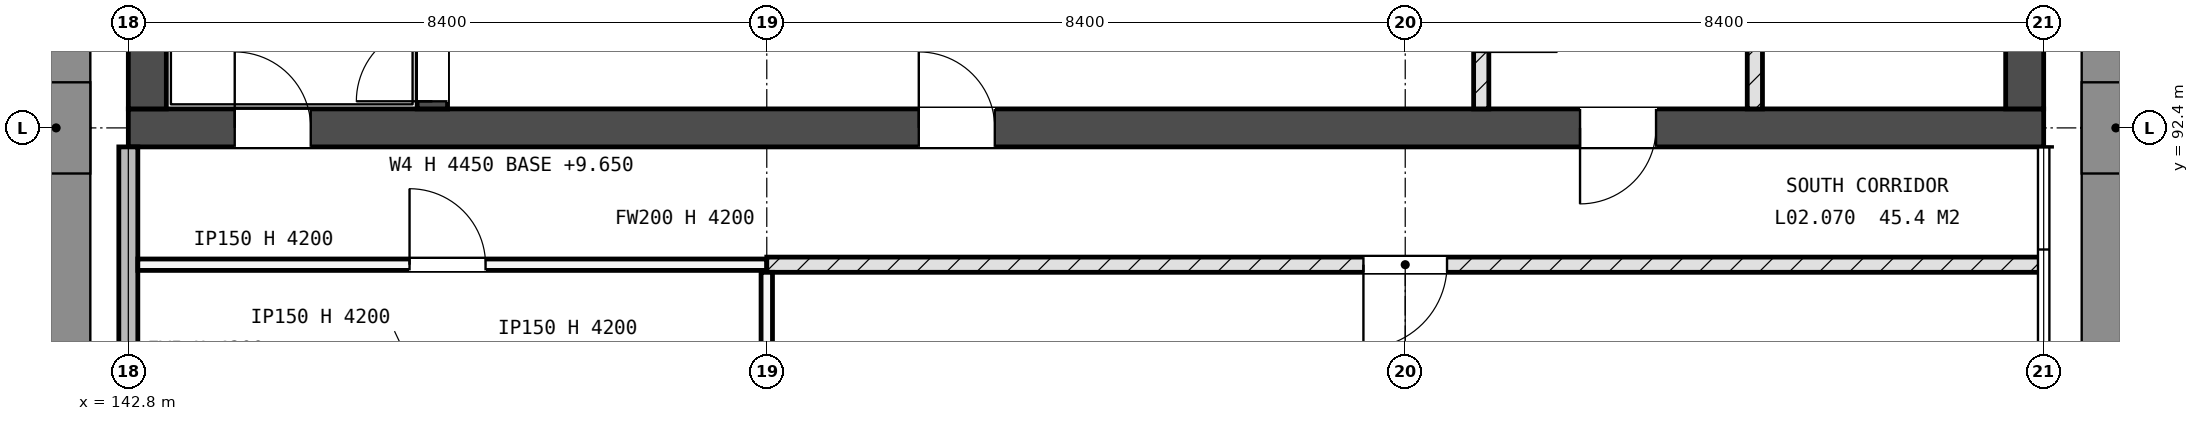
"""IFC4 building model, lengths in metres.
Left out: names, types, materials, properties, quantities, classifications, styles, units other than length and angle.
Written with IfcOpenShell. Run it as: python <this file> out.ifc"""

import sys

from ifc_helpers import new_model, si_unit, direction, frame, frame_2d, origin, place, context, subcontext, project, spatial, rectangle, extrude, element, fill, save


model = new_model("IFC4")
c1 = context("Model", 3, precision=1e-05, world=origin(), true_north=direction((0.0, 1.0)))
c2 = subcontext(c1, "Body", "Model", "MODEL_VIEW")
j1 = project(units=[si_unit("LENGTHUNIT", "METRE"), si_unit("PLANEANGLEUNIT", "RADIAN")], contexts=[c1])
p1 = place(None, origin())
s1 = spatial("IfcSite", under=j1, at=p1, CompositionType="ELEMENT")
p2 = place(p1, origin())
s2 = spatial("IfcBuilding", under=s1, at=p2, CompositionType="ELEMENT")
p3 = place(p2, frame((0.0, 0.0, 9.9)))
s3 = spatial("IfcBuildingStorey", under=s2, at=p3, CompositionType="ELEMENT", Elevation=9.9)
p4 = place(p3, frame((142.8, 92.4, -0.25), z_axis=(0.0, 0.0, 1.0), x_axis=(1.0, 0.0, 0.0)))
e1 = element("IfcWall", 1, at=p4, inside=s3, PredefinedType="SHEAR", context=c2, shape_type="SweptSolid", body=[
    extrude(rectangle(XDim=25.2, YDim=0.5, at=frame_2d((12.6, 0.0))), origin(), (0.0, 0.0, 1.0), 4.45),
])
p5 = place(p4, frame((1.4, 0.0, 0.25)))
e2 = element("IfcOpeningElement", 2, at=p5, cuts=e1, PredefinedType="OPENING", context=c2, shape_type="SweptSolid", body=[
    extrude(rectangle(XDim=1.0, YDim=2.1, at=frame_2d((0.5, 1.05))), frame((0.0, 0.26, 0.0), z_axis=(0.0, -1.0, 0.0), x_axis=(1.0, 0.0, 0.0)), (0.0, 0.0, 1.0), 0.52),
])
p6 = place(p4, frame((19.1, 0.0, 0.25)))
e3 = element("IfcOpeningElement", 3, at=p6, cuts=e1, PredefinedType="OPENING", context=c2, shape_type="SweptSolid", body=[
    extrude(rectangle(XDim=1.0, YDim=2.1, at=frame_2d((0.5, 1.05))), frame((0.0, 0.26, 0.0), z_axis=(0.0, -1.0, 0.0), x_axis=(1.0, 0.0, 0.0)), (0.0, 0.0, 1.0), 0.52),
])
p7 = place(p4, frame((10.4, 0.0, 0.25)))
e4 = element("IfcOpeningElement", 4, at=p7, cuts=e1, PredefinedType="OPENING", context=c2, shape_type="SweptSolid", body=[
    extrude(rectangle(XDim=1.0, YDim=2.1, at=frame_2d((0.5, 1.05))), frame((0.0, 0.26, 0.0), z_axis=(0.0, -1.0, 0.0), x_axis=(1.0, 0.0, 0.0)), (0.0, 0.0, 1.0), 0.52),
])
p8 = place(p3, frame((143.05, 92.65, -0.25), z_axis=(0.0, 0.0, 1.0), x_axis=(0.0, 1.0, 0.0)))
e5 = element("IfcWall", 5, at=p8, inside=s3, PredefinedType="SHEAR", context=c2, shape_type="SweptSolid", body=[
    extrude(rectangle(XDim=16.3, YDim=0.5, at=frame_2d((8.15, 0.0))), origin(), (0.0, 0.0, 1.0), 4.45),
])
p9 = place(p8, frame((2.95, 0.0, 1.85)))
e6 = element("IfcOpeningElement", 6, at=p9, cuts=e5, PredefinedType="OPENING", context=c2, shape_type="SweptSolid", body=[
    extrude(rectangle(XDim=1.2, YDim=0.9, at=frame_2d((0.6, 0.45))), frame((0.0, 0.26, 0.0), z_axis=(0.0, -1.0, 0.0), x_axis=(1.0, 0.0, 0.0)), (0.0, 0.0, 1.0), 0.52),
])
p10 = place(p3, frame((167.75, 92.65, -0.25), z_axis=(0.0, 0.0, 1.0), x_axis=(0.0, 1.0, 0.0)))
e7 = element("IfcWall", 7, at=p10, inside=s3, PredefinedType="SHEAR", context=c2, shape_type="SweptSolid", body=[
    extrude(rectangle(XDim=16.3, YDim=0.5, at=frame_2d((8.15, 0.0))), origin(), (0.0, 0.0, 1.0), 4.45),
])
p11 = place(p10, frame((12.15, 0.0, 1.85)))
e8 = element("IfcOpeningElement", 8, at=p11, cuts=e7, PredefinedType="OPENING", context=c2, shape_type="SweptSolid", body=[
    extrude(rectangle(XDim=1.2, YDim=0.9, at=frame_2d((0.6, 0.45))), frame((0.0, 0.26, 0.0), z_axis=(0.0, -1.0, 0.0), x_axis=(1.0, 0.0, 0.0)), (0.0, 0.0, 1.0), 0.52),
])
p12 = place(p3, frame((146.8, 92.65, -0.25), z_axis=(0.0, 0.0, 1.0), x_axis=(0.0, 1.0, 0.0)))
e9 = element("IfcWall", 9, at=p12, inside=s3, PredefinedType="SHEAR", context=c2, shape_type="SweptSolid", body=[
    extrude(rectangle(XDim=7.475, YDim=0.4, at=frame_2d((3.738, 0.0))), origin(), (0.0, 0.0, 1.0), 4.45),
])
p13 = place(p12, frame((0.1, 0.0, 0.25)))
e10 = element("IfcOpeningElement", 10, at=p13, cuts=e9, PredefinedType="OPENING", context=c2, shape_type="SweptSolid", body=[
    extrude(rectangle(XDim=1.0, YDim=2.1, at=frame_2d((0.5, 1.05))), frame((0.0, 0.21, 0.0), z_axis=(0.0, -1.0, 0.0), x_axis=(1.0, 0.0, 0.0)), (0.0, 0.0, 1.0), 0.42),
])
p14 = place(p3, frame((142.8, 84.5, 0.0), z_axis=(0.0, 0.0, 1.0), x_axis=(0.0, 1.0, 0.0)))
e11 = element("IfcWall", 11, at=p14, inside=s3, PredefinedType="STANDARD", context=c2, shape_type="SweptSolid", body=[
    extrude(rectangle(XDim=7.65, YDim=0.25, at=frame_2d((3.825, 0.0))), origin(), (0.0, 0.0, 1.0), 4.2),
])
p15 = place(p14, frame((2.2, 0.0, 2.1)))
e12 = element("IfcOpeningElement", 12, at=p15, cuts=e11, PredefinedType="OPENING", context=c2, shape_type="SweptSolid", body=[
    extrude(rectangle(XDim=0.9, YDim=0.6, at=frame_2d((0.45, 0.3))), frame((0.0, 0.135, 0.0), z_axis=(0.0, -1.0, 0.0), x_axis=(1.0, 0.0, 0.0)), (0.0, 0.0, 1.0), 0.27),
])
p16 = place(p3, frame((142.925, 90.6, 0.0), z_axis=(0.0, 0.0, 1.0), x_axis=(1.0, 0.0, 0.0)))
e13 = element("IfcWall", 13, at=p16, inside=s3, PredefinedType="PARTITIONING", context=c2, shape_type="SweptSolid", body=[
    extrude(rectangle(XDim=8.275, YDim=0.15, at=frame_2d((4.137, 0.0))), origin(), (0.0, 0.0, 1.0), 4.2),
])
p17 = place(p16, frame((3.575, 0.0, 0.0)))
e14 = element("IfcOpeningElement", 14, at=p17, cuts=e13, PredefinedType="OPENING", context=c2, shape_type="SweptSolid", body=[
    extrude(rectangle(XDim=1.0, YDim=2.1, at=frame_2d((0.5, 1.05))), frame((0.0, 0.085, 0.0), z_axis=(0.0, -1.0, 0.0), x_axis=(1.0, 0.0, 0.0)), (0.0, 0.0, 1.0), 0.17),
])
p18 = place(p3, frame((151.2, 90.6, 0.0), z_axis=(0.0, 0.0, 1.0), x_axis=(1.0, 0.0, 0.0)))
e15 = element("IfcWall", 15, at=p18, inside=s3, PredefinedType="SOLIDWALL", context=c2, shape_type="SweptSolid", body=[
    extrude(rectangle(XDim=16.8, YDim=0.2, at=frame_2d((8.4, 0.0))), origin(), (0.0, 0.0, 1.0), 4.2),
])
p19 = place(p18, frame((7.85, 0.0, 0.0)))
e16 = element("IfcOpeningElement", 16, at=p19, cuts=e15, PredefinedType="OPENING", context=c2, shape_type="SweptSolid", body=[
    extrude(rectangle(XDim=1.1, YDim=2.25, at=frame_2d((0.55, 1.125))), frame((0.0, 0.11, 0.0), z_axis=(0.0, -1.0, 0.0), x_axis=(1.0, 0.0, 0.0)), (0.0, 0.0, 1.0), 0.22),
])
p20 = place(p3, frame((151.2, 84.0, 0.0), z_axis=(0.0, 0.0, 1.0), x_axis=(0.0, 1.0, 0.0)))
e17 = element("IfcWall", 17, at=p20, inside=s3, PredefinedType="PARTITIONING", context=c2, shape_type="SweptSolid", body=[
    extrude(rectangle(XDim=6.5, YDim=0.15, at=frame_2d((3.25, 0.0))), origin(), (0.0, 0.0, 1.0), 3.4),
])
p21 = place(p3, frame((160.6, 92.65, 0.0), z_axis=(0.0, 0.0, 1.0), x_axis=(0.0, 1.0, 0.0)))
e18 = element("IfcWall", 18, at=p21, inside=s3, PredefinedType="SOLIDWALL", context=c2, shape_type="SweptSolid", body=[
    extrude(rectangle(XDim=12.45, YDim=0.2, at=frame_2d((6.225, 0.0))), origin(), (0.0, 0.0, 1.0), 4.2),
])
p22 = place(p21, frame((5.05, 0.0, 0.0)))
e19 = element("IfcOpeningElement", 19, at=p22, cuts=e18, PredefinedType="OPENING", context=c2, shape_type="SweptSolid", body=[
    extrude(rectangle(XDim=0.8, YDim=2.1, at=frame_2d((0.4, 1.05))), frame((0.0, 0.11, 0.0), z_axis=(0.0, -1.0, 0.0), x_axis=(1.0, 0.0, 0.0)), (0.0, 0.0, 1.0), 0.22),
])
p23 = place(p21, frame((0.75, 0.0, 0.0)))
e20 = element("IfcOpeningElement", 20, at=p23, cuts=e18, PredefinedType="OPENING", context=c2, shape_type="SweptSolid", body=[
    extrude(rectangle(XDim=1.0, YDim=2.1, at=frame_2d((0.5, 1.05))), frame((0.0, 0.11, 0.0), z_axis=(0.0, -1.0, 0.0), x_axis=(1.0, 0.0, 0.0)), (0.0, 0.0, 1.0), 0.22),
])
p24 = place(p3, frame((164.2, 92.65, 0.0), z_axis=(0.0, 0.0, 1.0), x_axis=(0.0, 1.0, 0.0)))
e21 = element("IfcWall", 21, at=p24, inside=s3, PredefinedType="SOLIDWALL", context=c2, shape_type="SweptSolid", body=[
    extrude(rectangle(XDim=8.7, YDim=0.2, at=frame_2d((4.35, 0.0))), origin(), (0.0, 0.0, 1.0), 4.2),
])
p25 = place(p24, frame((1.65, 0.0, 0.0)))
e22 = element("IfcOpeningElement", 22, at=p25, cuts=e21, PredefinedType="OPENING", context=c2, shape_type="SweptSolid", body=[
    extrude(rectangle(XDim=0.8, YDim=2.1, at=frame_2d((0.4, 1.05))), frame((0.0, 0.11, 0.0), z_axis=(0.0, -1.0, 0.0), x_axis=(1.0, 0.0, 0.0)), (0.0, 0.0, 1.0), 0.22),
])
p26 = place(p24, frame((6.25, 0.0, 0.0)))
e23 = element("IfcOpeningElement", 23, at=p26, cuts=e21, PredefinedType="OPENING", context=c2, shape_type="SweptSolid", body=[
    extrude(rectangle(XDim=0.8, YDim=2.1, at=frame_2d((0.4, 1.05))), frame((0.0, 0.11, 0.0), z_axis=(0.0, -1.0, 0.0), x_axis=(1.0, 0.0, 0.0)), (0.0, 0.0, 1.0), 0.22),
])
p27 = place(p5, origin())
e24 = element("IfcDoor", 24, at=p27, inside=s3, OperationType="SINGLE_SWING_RIGHT", PredefinedType="DOOR", context=c2, shape_type="SweptSolid", body=[
    extrude(rectangle(XDim=1.0, YDim=2.1, at=frame_2d((0.5, 1.05))), frame((0.0, 0.025, 0.0), z_axis=(0.0, -1.0, 0.0), x_axis=(1.0, 0.0, 0.0)), (0.0, 0.0, 1.0), 0.05),
])
fill(e2, e24)
p28 = place(p13, origin())
e25 = element("IfcDoor", 25, at=p28, inside=s3, OperationType="SINGLE_SWING_RIGHT", PredefinedType="DOOR", context=c2, shape_type="SweptSolid", body=[
    extrude(rectangle(XDim=1.0, YDim=2.1, at=frame_2d((0.5, 1.05))), frame((0.0, 0.025, 0.0), z_axis=(0.0, -1.0, 0.0), x_axis=(1.0, 0.0, 0.0)), (0.0, 0.0, 1.0), 0.05),
])
fill(e10, e25)
p29 = place(p19, origin())
e26 = element("IfcDoor", 26, at=p29, inside=s3, OperationType="SINGLE_SWING_LEFT", PredefinedType="DOOR", context=c2, shape_type="SweptSolid", body=[
    extrude(rectangle(XDim=1.1, YDim=2.25, at=frame_2d((0.55, 1.125))), frame((0.0, 0.025, 0.0), z_axis=(0.0, -1.0, 0.0), x_axis=(1.0, 0.0, 0.0)), (0.0, 0.0, 1.0), 0.05),
])
fill(e16, e26)
p30 = place(p17, origin())
e27 = element("IfcDoor", 27, at=p30, inside=s3, OperationType="SINGLE_SWING_RIGHT", PredefinedType="DOOR", context=c2, shape_type="SweptSolid", body=[
    extrude(rectangle(XDim=1.0, YDim=2.1, at=frame_2d((0.5, 1.05))), frame((0.0, 0.025, 0.0), z_axis=(0.0, -1.0, 0.0), x_axis=(1.0, 0.0, 0.0)), (0.0, 0.0, 1.0), 0.05),
])
fill(e14, e27)
p31 = place(p6, origin())
e28 = element("IfcDoor", 28, at=p31, inside=s3, OperationType="SINGLE_SWING_LEFT", PredefinedType="DOOR", context=c2, shape_type="SweptSolid", body=[
    extrude(rectangle(XDim=1.0, YDim=2.1, at=frame_2d((0.5, 1.05))), frame((0.0, 0.025, 0.0), z_axis=(0.0, -1.0, 0.0), x_axis=(1.0, 0.0, 0.0)), (0.0, 0.0, 1.0), 0.05),
])
fill(e3, e28)
p32 = place(p7, origin())
e29 = element("IfcDoor", 29, at=p32, inside=s3, OperationType="SINGLE_SWING_RIGHT", PredefinedType="DOOR", context=c2, shape_type="SweptSolid", body=[
    extrude(rectangle(XDim=1.0, YDim=2.1, at=frame_2d((0.5, 1.05))), frame((0.0, 0.025, 0.0), z_axis=(0.0, -1.0, 0.0), x_axis=(1.0, 0.0, 0.0)), (0.0, 0.0, 1.0), 0.05),
])
fill(e4, e29)
save(model, sys.argv[1])
